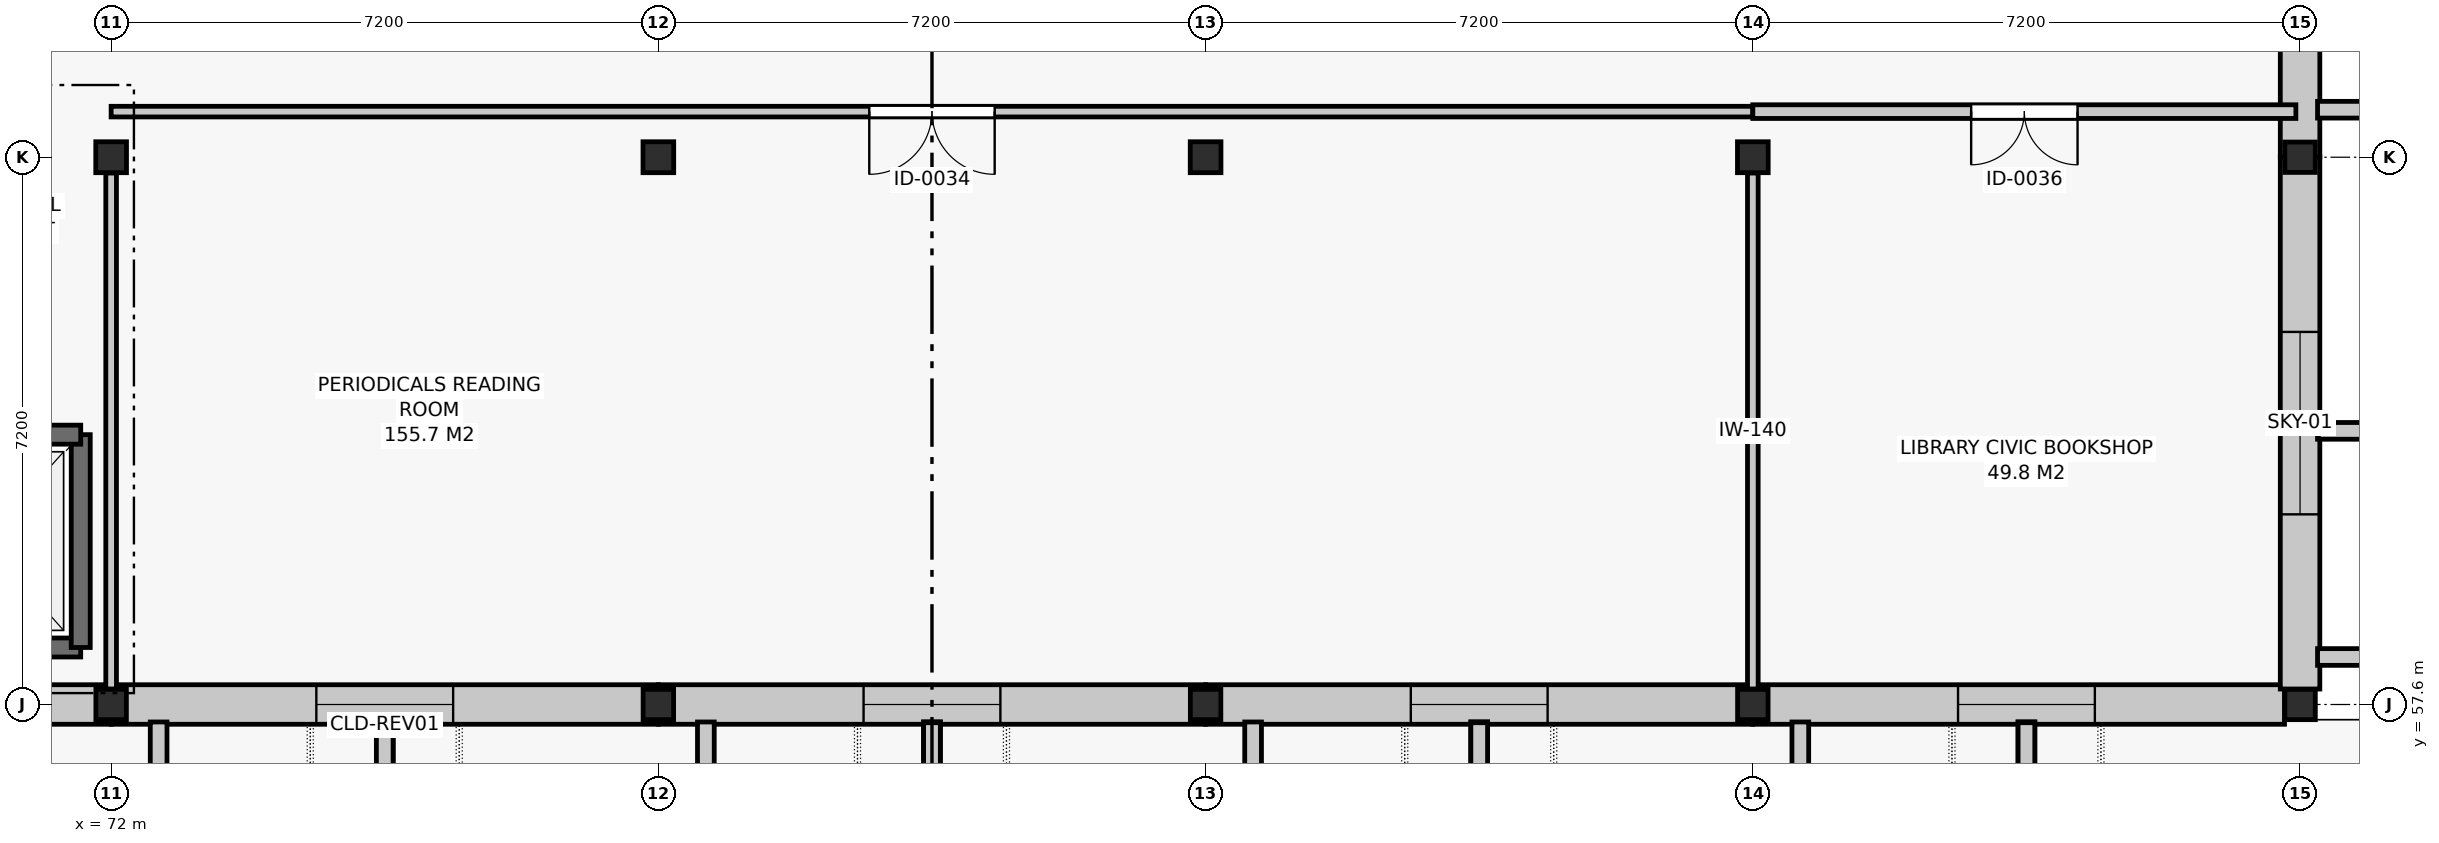
"""IFC4 building model, lengths in metres.
Left out: names, types, materials, properties, quantities, classifications, styles, units other than length and angle.
Written with IfcOpenShell. Run it as: python <this file> out.ifc"""

import sys

from ifc_helpers import new_model, si_unit, direction, frame, frame_2d, origin, origin_2d, place, context, subcontext, project, spatial, rectangle, i_section, extrude, element, fill, save


model = new_model("IFC4")
c1 = context("Model", 3, precision=1e-05, world=origin(), true_north=direction((0.0, 1.0)))
c2 = subcontext(c1, "Body", "Model", "MODEL_VIEW")
j1 = project(units=[si_unit("LENGTHUNIT", "METRE"), si_unit("PLANEANGLEUNIT", "RADIAN")], contexts=[c1])
p1 = place(None, origin())
s1 = spatial("IfcSite", under=j1, at=p1, CompositionType="ELEMENT")
p2 = place(p1, origin())
s2 = spatial("IfcBuilding", under=s1, at=p2, CompositionType="ELEMENT")
p3 = place(p2, origin())
s3 = spatial("IfcBuildingStorey", under=s2, at=p3, CompositionType="ELEMENT", Elevation=0.0)
p4 = place(p3, frame((72.0, 57.6, 0.0), z_axis=(0.0, 0.0, 1.0), x_axis=(1.0, 0.0, 0.0)))
e1 = element("IfcColumn", 1, at=p4, inside=s3, PredefinedType="COLUMN", context=c2, shape_type="SweptSolid", body=[
    extrude(i_section(OverallWidth=0.401, OverallDepth=0.399, WebThickness=0.019, FlangeThickness=0.029, FilletRadius=0.015, at=origin_2d()), origin(), (0.0, 0.0, 1.0), 5.4),
])
p5 = place(p3, frame((72.0, 64.8, 0.0), z_axis=(0.0, 0.0, 1.0), x_axis=(1.0, 0.0, 0.0)))
e2 = element("IfcColumn", 2, at=p5, inside=s3, PredefinedType="COLUMN", context=c2, shape_type="SweptSolid", body=[
    extrude(i_section(OverallWidth=0.404, OverallDepth=0.407, WebThickness=0.02, FlangeThickness=0.032, FilletRadius=0.015, at=origin_2d()), origin(), (0.0, 0.0, 1.0), 5.4),
])
p6 = place(p3, frame((79.2, 57.6, 0.0), z_axis=(0.0, 0.0, 1.0), x_axis=(1.0, 0.0, 0.0)))
e3 = element("IfcColumn", 3, at=p6, inside=s3, PredefinedType="COLUMN", context=c2, shape_type="SweptSolid", body=[
    extrude(i_section(OverallWidth=0.401, OverallDepth=0.399, WebThickness=0.019, FlangeThickness=0.029, FilletRadius=0.015, at=origin_2d()), origin(), (0.0, 0.0, 1.0), 5.4),
])
p7 = place(p3, frame((79.2, 64.8, 0.0), z_axis=(0.0, 0.0, 1.0), x_axis=(1.0, 0.0, 0.0)))
e4 = element("IfcColumn", 4, at=p7, inside=s3, PredefinedType="COLUMN", context=c2, shape_type="SweptSolid", body=[
    extrude(i_section(OverallWidth=0.404, OverallDepth=0.407, WebThickness=0.02, FlangeThickness=0.032, FilletRadius=0.015, at=origin_2d()), origin(), (0.0, 0.0, 1.0), 5.4),
])
p8 = place(p3, frame((86.4, 57.6, 0.0), z_axis=(0.0, 0.0, 1.0), x_axis=(1.0, 0.0, 0.0)))
e5 = element("IfcColumn", 5, at=p8, inside=s3, PredefinedType="COLUMN", context=c2, shape_type="SweptSolid", body=[
    extrude(i_section(OverallWidth=0.401, OverallDepth=0.399, WebThickness=0.019, FlangeThickness=0.029, FilletRadius=0.015, at=origin_2d()), origin(), (0.0, 0.0, 1.0), 5.4),
])
p9 = place(p3, frame((86.4, 64.8, 0.0), z_axis=(0.0, 0.0, 1.0), x_axis=(1.0, 0.0, 0.0)))
e6 = element("IfcColumn", 6, at=p9, inside=s3, PredefinedType="COLUMN", context=c2, shape_type="SweptSolid", body=[
    extrude(i_section(OverallWidth=0.404, OverallDepth=0.407, WebThickness=0.02, FlangeThickness=0.032, FilletRadius=0.015, at=origin_2d()), origin(), (0.0, 0.0, 1.0), 5.4),
])
p10 = place(p3, frame((93.6, 57.6, 0.0), z_axis=(0.0, 0.0, 1.0), x_axis=(1.0, 0.0, 0.0)))
e7 = element("IfcColumn", 7, at=p10, inside=s3, PredefinedType="COLUMN", context=c2, shape_type="SweptSolid", body=[
    extrude(i_section(OverallWidth=0.401, OverallDepth=0.399, WebThickness=0.019, FlangeThickness=0.029, FilletRadius=0.015, at=origin_2d()), origin(), (0.0, 0.0, 1.0), 5.4),
])
p11 = place(p3, frame((93.6, 64.8, 0.0), z_axis=(0.0, 0.0, 1.0), x_axis=(1.0, 0.0, 0.0)))
e8 = element("IfcColumn", 8, at=p11, inside=s3, PredefinedType="COLUMN", context=c2, shape_type="SweptSolid", body=[
    extrude(i_section(OverallWidth=0.404, OverallDepth=0.407, WebThickness=0.02, FlangeThickness=0.032, FilletRadius=0.015, at=origin_2d()), origin(), (0.0, 0.0, 1.0), 5.4),
])
for number, where, z_axis, x_axis in (
    (9, (100.8, 57.6, 0.0), (0.0, 0.0, 1.0), (1.0, 0.0, 0.0)),
    (10, (100.8, 64.8, 0.0), (0.0, 0.0, 1.0), (1.0, 0.0, 0.0)),
):
    element("IfcColumn", number, at=place(p3, frame(where, z_axis=z_axis, x_axis=x_axis)), inside=s3, PredefinedType="COLUMN", context=c2, shape_type="SweptSolid", body=[
        extrude(i_section(OverallWidth=0.401, OverallDepth=0.399, WebThickness=0.019, FlangeThickness=0.029, FilletRadius=0.015, at=origin_2d()), origin(), (0.0, 0.0, 1.0), 5.4),
    ])
p12 = place(p3, frame((65.004, 57.6, 0.0), z_axis=(0.0, 0.0, 1.0), x_axis=(1.0, 0.0, 0.0)))
e11 = element("IfcWall", 11, at=p12, inside=s3, PredefinedType="SOLIDWALL", context=c2, shape_type="SweptSolid", body=[
    extrude(rectangle(XDim=6.996, YDim=0.52, at=frame_2d((3.498, 0.0))), origin(), (0.0, 0.0, 1.0), 4.4),
])
p13 = place(p3, frame((72.0, 57.6, 0.0), z_axis=(0.0, 0.0, 1.0), x_axis=(1.0, 0.0, 0.0)))
e12 = element("IfcWall", 12, at=p13, inside=s3, PredefinedType="SOLIDWALL", context=c2, shape_type="SweptSolid", body=[
    extrude(rectangle(XDim=7.2, YDim=0.52, at=frame_2d((3.6, 0.0))), origin(), (0.0, 0.0, 1.0), 4.4),
])
p14 = place(p13, frame((2.7, 0.0, 0.9)))
e13 = element("IfcOpeningElement", 13, at=p14, cuts=e12, PredefinedType="OPENING", context=c2, shape_type="SweptSolid", body=[
    extrude(rectangle(XDim=1.8, YDim=2.45, at=frame_2d((0.9, 1.225))), frame((0.0, 0.272, 0.0), z_axis=(0.0, -1.0, 0.0), x_axis=(1.0, 0.0, 0.0)), (0.0, 0.0, 1.0), 0.544),
])
p15 = place(p3, frame((79.2, 57.6, 0.0), z_axis=(0.0, 0.0, 1.0), x_axis=(1.0, 0.0, 0.0)))
e14 = element("IfcWall", 14, at=p15, inside=s3, PredefinedType="SOLIDWALL", context=c2, shape_type="SweptSolid", body=[
    extrude(rectangle(XDim=7.2, YDim=0.52, at=frame_2d((3.6, 0.0))), origin(), (0.0, 0.0, 1.0), 4.4),
])
p16 = place(p15, frame((2.7, 0.0, 0.9)))
e15 = element("IfcOpeningElement", 15, at=p16, cuts=e14, PredefinedType="OPENING", context=c2, shape_type="SweptSolid", body=[
    extrude(rectangle(XDim=1.8, YDim=2.45, at=frame_2d((0.9, 1.225))), frame((0.0, 0.272, 0.0), z_axis=(0.0, -1.0, 0.0), x_axis=(1.0, 0.0, 0.0)), (0.0, 0.0, 1.0), 0.544),
])
p17 = place(p3, frame((86.4, 57.6, 0.0), z_axis=(0.0, 0.0, 1.0), x_axis=(1.0, 0.0, 0.0)))
e16 = element("IfcWall", 16, at=p17, inside=s3, PredefinedType="SOLIDWALL", context=c2, shape_type="SweptSolid", body=[
    extrude(rectangle(XDim=7.2, YDim=0.52, at=frame_2d((3.6, 0.0))), origin(), (0.0, 0.0, 1.0), 4.4),
])
p18 = place(p17, frame((2.7, 0.0, 0.9)))
e17 = element("IfcOpeningElement", 17, at=p18, cuts=e16, PredefinedType="OPENING", context=c2, shape_type="SweptSolid", body=[
    extrude(rectangle(XDim=1.8, YDim=2.45, at=frame_2d((0.9, 1.225))), frame((0.0, 0.272, 0.0), z_axis=(0.0, -1.0, 0.0), x_axis=(1.0, 0.0, 0.0)), (0.0, 0.0, 1.0), 0.544),
])
p19 = place(p3, frame((93.6, 57.6, 0.0), z_axis=(0.0, 0.0, 1.0), x_axis=(1.0, 0.0, 0.0)))
e18 = element("IfcWall", 18, at=p19, inside=s3, PredefinedType="SOLIDWALL", context=c2, shape_type="SweptSolid", body=[
    extrude(rectangle(XDim=6.995, YDim=0.52, at=frame_2d((3.498, 0.0))), origin(), (0.0, 0.0, 1.0), 4.4),
])
p20 = place(p19, frame((2.7, 0.0, 0.9)))
e19 = element("IfcOpeningElement", 19, at=p20, cuts=e18, PredefinedType="OPENING", context=c2, shape_type="SweptSolid", body=[
    extrude(rectangle(XDim=1.8, YDim=2.45, at=frame_2d((0.9, 1.225))), frame((0.0, 0.272, 0.0), z_axis=(0.0, -1.0, 0.0), x_axis=(1.0, 0.0, 0.0)), (0.0, 0.0, 1.0), 0.544),
])
p21 = place(p3, frame((100.8, 57.803, 0.0), z_axis=(0.0, 0.0, 1.0), x_axis=(0.0, 1.0, 0.0)))
e20 = element("IfcWall", 20, at=p21, inside=s3, PredefinedType="SOLIDWALL", context=c2, shape_type="SweptSolid", body=[
    extrude(rectangle(XDim=6.997, YDim=0.52, at=frame_2d((3.498, 0.0))), origin(), (0.0, 0.0, 1.0), 4.4),
])
p22 = place(p21, frame((2.298, 0.0, 1.65)))
e21 = element("IfcOpeningElement", 21, at=p22, cuts=e20, PredefinedType="OPENING", context=c2, shape_type="SweptSolid", body=[
    extrude(rectangle(XDim=2.4, YDim=0.95, at=frame_2d((1.2, 0.475))), frame((0.0, 0.272, 0.0), z_axis=(0.0, -1.0, 0.0), x_axis=(1.0, 0.0, 0.0)), (0.0, 0.0, 1.0), 0.544),
])
p23 = place(p3, frame((100.8, 64.8, 0.0), z_axis=(0.0, 0.0, 1.0), x_axis=(0.0, 1.0, 0.0)))
e22 = element("IfcWall", 22, at=p23, inside=s3, PredefinedType="SOLIDWALL", context=c2, shape_type="SweptSolid", body=[
    extrude(rectangle(XDim=7.2, YDim=0.52, at=frame_2d((3.6, 0.0))), origin(), (0.0, 0.0, 1.0), 4.4),
])
p24 = place(p23, frame((2.7, 0.0, 0.9)))
e23 = element("IfcOpeningElement", 23, at=p24, cuts=e22, PredefinedType="OPENING", context=c2, shape_type="SweptSolid", body=[
    extrude(rectangle(XDim=1.8, YDim=2.45, at=frame_2d((0.9, 1.225))), frame((0.0, 0.272, 0.0), z_axis=(0.0, -1.0, 0.0), x_axis=(1.0, 0.0, 0.0)), (0.0, 0.0, 1.0), 0.544),
])
p25 = place(p3, frame((69.05, 58.35, 0.0), z_axis=(0.0, 0.0, 1.0), x_axis=(1.0, 0.0, 0.0)))
e24 = element("IfcWall", 24, at=p25, inside=s3, PredefinedType="SHEAR", context=c2, shape_type="SweptSolid", body=[
    extrude(rectangle(XDim=2.55, YDim=0.25, at=frame_2d((1.275, 0.0))), origin(), (0.0, 0.0, 1.0), 5.12),
])
p26 = place(p3, frame((71.6, 58.35, 0.0), z_axis=(0.0, 0.0, 1.0), x_axis=(0.0, 1.0, 0.0)))
e25 = element("IfcWall", 25, at=p26, inside=s3, PredefinedType="SHEAR", context=c2, shape_type="SweptSolid", body=[
    extrude(rectangle(XDim=2.8, YDim=0.25, at=frame_2d((1.4, 0.0))), origin(), (0.0, 0.0, 1.0), 5.12),
])
p27 = place(p3, frame((71.6, 61.15, 0.0), z_axis=(0.0, 0.0, 1.0), x_axis=(-1.0, 0.0, 0.0)))
e26 = element("IfcWall", 26, at=p27, inside=s3, PredefinedType="SHEAR", context=c2, shape_type="SweptSolid", body=[
    extrude(rectangle(XDim=2.55, YDim=0.25, at=frame_2d((1.275, 0.0))), origin(), (0.0, 0.0, 1.0), 5.12),
])
p28 = place(p27, frame((0.725, 0.0, 0.0)))
e27 = element("IfcOpeningElement", 27, at=p28, cuts=e26, PredefinedType="OPENING", context=c2, shape_type="SweptSolid", body=[
    extrude(rectangle(XDim=1.1, YDim=2.1, at=frame_2d((0.55, 1.05))), frame((0.0, 0.137, 0.0), z_axis=(0.0, -1.0, 0.0), x_axis=(1.0, 0.0, 0.0)), (0.0, 0.0, 1.0), 0.274),
])
p29 = place(p3, frame((72.0, 65.4, 0.0), z_axis=(0.0, 0.0, 1.0), x_axis=(1.0, 0.0, 0.0)))
e28 = element("IfcWall", 28, at=p29, inside=s3, PredefinedType="PARTITIONING", context=c2, shape_type="SweptSolid", body=[
    extrude(rectangle(XDim=21.6, YDim=0.14, at=frame_2d((10.8, 0.0))), origin(), (0.0, 0.0, 1.0), 4.665),
])
p30 = place(p29, frame((9.975, 0.0, 0.0)))
e29 = element("IfcOpeningElement", 29, at=p30, cuts=e28, PredefinedType="OPENING", context=c2, shape_type="SweptSolid", body=[
    extrude(rectangle(XDim=1.65, YDim=2.25, at=frame_2d((0.825, 1.125))), frame((0.0, 0.082, 0.0), z_axis=(0.0, -1.0, 0.0), x_axis=(1.0, 0.0, 0.0)), (0.0, 0.0, 1.0), 0.164),
])
p31 = place(p3, frame((93.6, 65.4, 0.0), z_axis=(0.0, 0.0, 1.0), x_axis=(1.0, 0.0, 0.0)))
e30 = element("IfcWall", 30, at=p31, inside=s3, PredefinedType="PARTITIONING", context=c2, shape_type="SweptSolid", body=[
    extrude(rectangle(XDim=7.145, YDim=0.18, at=frame_2d((3.573, 0.0))), origin(), (0.0, 0.0, 1.0), 4.555),
])
p32 = place(p31, frame((2.873, 0.0, 0.0)))
e31 = element("IfcOpeningElement", 31, at=p32, cuts=e30, PredefinedType="OPENING", context=c2, shape_type="SweptSolid", body=[
    extrude(rectangle(XDim=1.4, YDim=2.2, at=frame_2d((0.7, 1.1))), frame((0.0, 0.102, 0.0), z_axis=(0.0, -1.0, 0.0), x_axis=(1.0, 0.0, 0.0)), (0.0, 0.0, 1.0), 0.204),
])
for number, where, z_axis, x_axis in (
    (32, (72.0, 57.803, 0.0), (0.0, 0.0, 1.0), (0.0, 1.0, 0.0)),
    (33, (93.6, 57.803, 0.0), (0.0, 0.0, 1.0), (0.0, 1.0, 0.0)),
):
    element("IfcWall", number, at=place(p3, frame(where, z_axis=z_axis, x_axis=x_axis)), inside=s3, PredefinedType="PARTITIONING", context=c2, shape_type="SweptSolid", body=[
        extrude(rectangle(XDim=6.789, YDim=0.14, at=frame_2d((3.395, 0.0))), origin(), (0.0, 0.0, 1.0), 4.665),
    ])
p33 = place(p14, origin())
e34 = element("IfcWindow", 34, at=p33, inside=s3, PartitioningType="SINGLE_PANEL", PredefinedType="WINDOW", context=c2, shape_type="SweptSolid", body=[
    extrude(rectangle(XDim=1.8, YDim=2.45, at=frame_2d((0.9, 1.225))), frame((0.0, 0.03, 0.0), z_axis=(0.0, -1.0, 0.0), x_axis=(1.0, 0.0, 0.0)), (0.0, 0.0, 1.0), 0.06),
])
fill(e13, e34)
p34 = place(p16, origin())
e35 = element("IfcWindow", 35, at=p34, inside=s3, PartitioningType="SINGLE_PANEL", PredefinedType="WINDOW", context=c2, shape_type="SweptSolid", body=[
    extrude(rectangle(XDim=1.8, YDim=2.45, at=frame_2d((0.9, 1.225))), frame((0.0, 0.03, 0.0), z_axis=(0.0, -1.0, 0.0), x_axis=(1.0, 0.0, 0.0)), (0.0, 0.0, 1.0), 0.06),
])
fill(e15, e35)
p35 = place(p18, origin())
e36 = element("IfcWindow", 36, at=p35, inside=s3, PartitioningType="SINGLE_PANEL", PredefinedType="WINDOW", context=c2, shape_type="SweptSolid", body=[
    extrude(rectangle(XDim=1.8, YDim=2.45, at=frame_2d((0.9, 1.225))), frame((0.0, 0.03, 0.0), z_axis=(0.0, -1.0, 0.0), x_axis=(1.0, 0.0, 0.0)), (0.0, 0.0, 1.0), 0.06),
])
fill(e17, e36)
p36 = place(p20, origin())
e37 = element("IfcWindow", 37, at=p36, inside=s3, PartitioningType="SINGLE_PANEL", PredefinedType="WINDOW", context=c2, shape_type="SweptSolid", body=[
    extrude(rectangle(XDim=1.8, YDim=2.45, at=frame_2d((0.9, 1.225))), frame((0.0, 0.03, 0.0), z_axis=(0.0, -1.0, 0.0), x_axis=(1.0, 0.0, 0.0)), (0.0, 0.0, 1.0), 0.06),
])
fill(e19, e37)
p37 = place(p22, origin())
e38 = element("IfcWindow", 38, at=p37, inside=s3, PartitioningType="SINGLE_PANEL", PredefinedType="SKYLIGHT", context=c2, shape_type="SweptSolid", body=[
    extrude(rectangle(XDim=2.4, YDim=0.95, at=frame_2d((1.2, 0.475))), frame((0.0, 0.03, 0.0), z_axis=(0.0, -1.0, 0.0), x_axis=(1.0, 0.0, 0.0)), (0.0, 0.0, 1.0), 0.06),
])
fill(e21, e38)
p38 = place(p30, frame((1.65, 0.0, 0.0), z_axis=(0.0, 0.0, 1.0), x_axis=(-1.0, 0.0, 0.0)))
e39 = element("IfcDoor", 39, at=p38, inside=s3, OperationType="DOUBLE_DOOR_SINGLE_SWING", PredefinedType="DOOR", context=c2, shape_type="SweptSolid", body=[
    extrude(rectangle(XDim=1.65, YDim=2.25, at=frame_2d((0.825, 1.125))), frame((0.0, 0.025, 0.0), z_axis=(0.0, -1.0, 0.0), x_axis=(1.0, 0.0, 0.0)), (0.0, 0.0, 1.0), 0.05),
])
fill(e29, e39)
p39 = place(p32, frame((1.4, 0.0, 0.0), z_axis=(0.0, 0.0, 1.0), x_axis=(-1.0, 0.0, 0.0)))
e40 = element("IfcDoor", 40, at=p39, inside=s3, OperationType="DOUBLE_DOOR_SINGLE_SWING", PredefinedType="DOOR", context=c2, shape_type="SweptSolid", body=[
    extrude(rectangle(XDim=1.4, YDim=2.2, at=frame_2d((0.7, 1.1))), frame((0.0, 0.025, 0.0), z_axis=(0.0, -1.0, 0.0), x_axis=(1.0, 0.0, 0.0)), (0.0, 0.0, 1.0), 0.05),
])
fill(e31, e40)
save(model, sys.argv[1])
